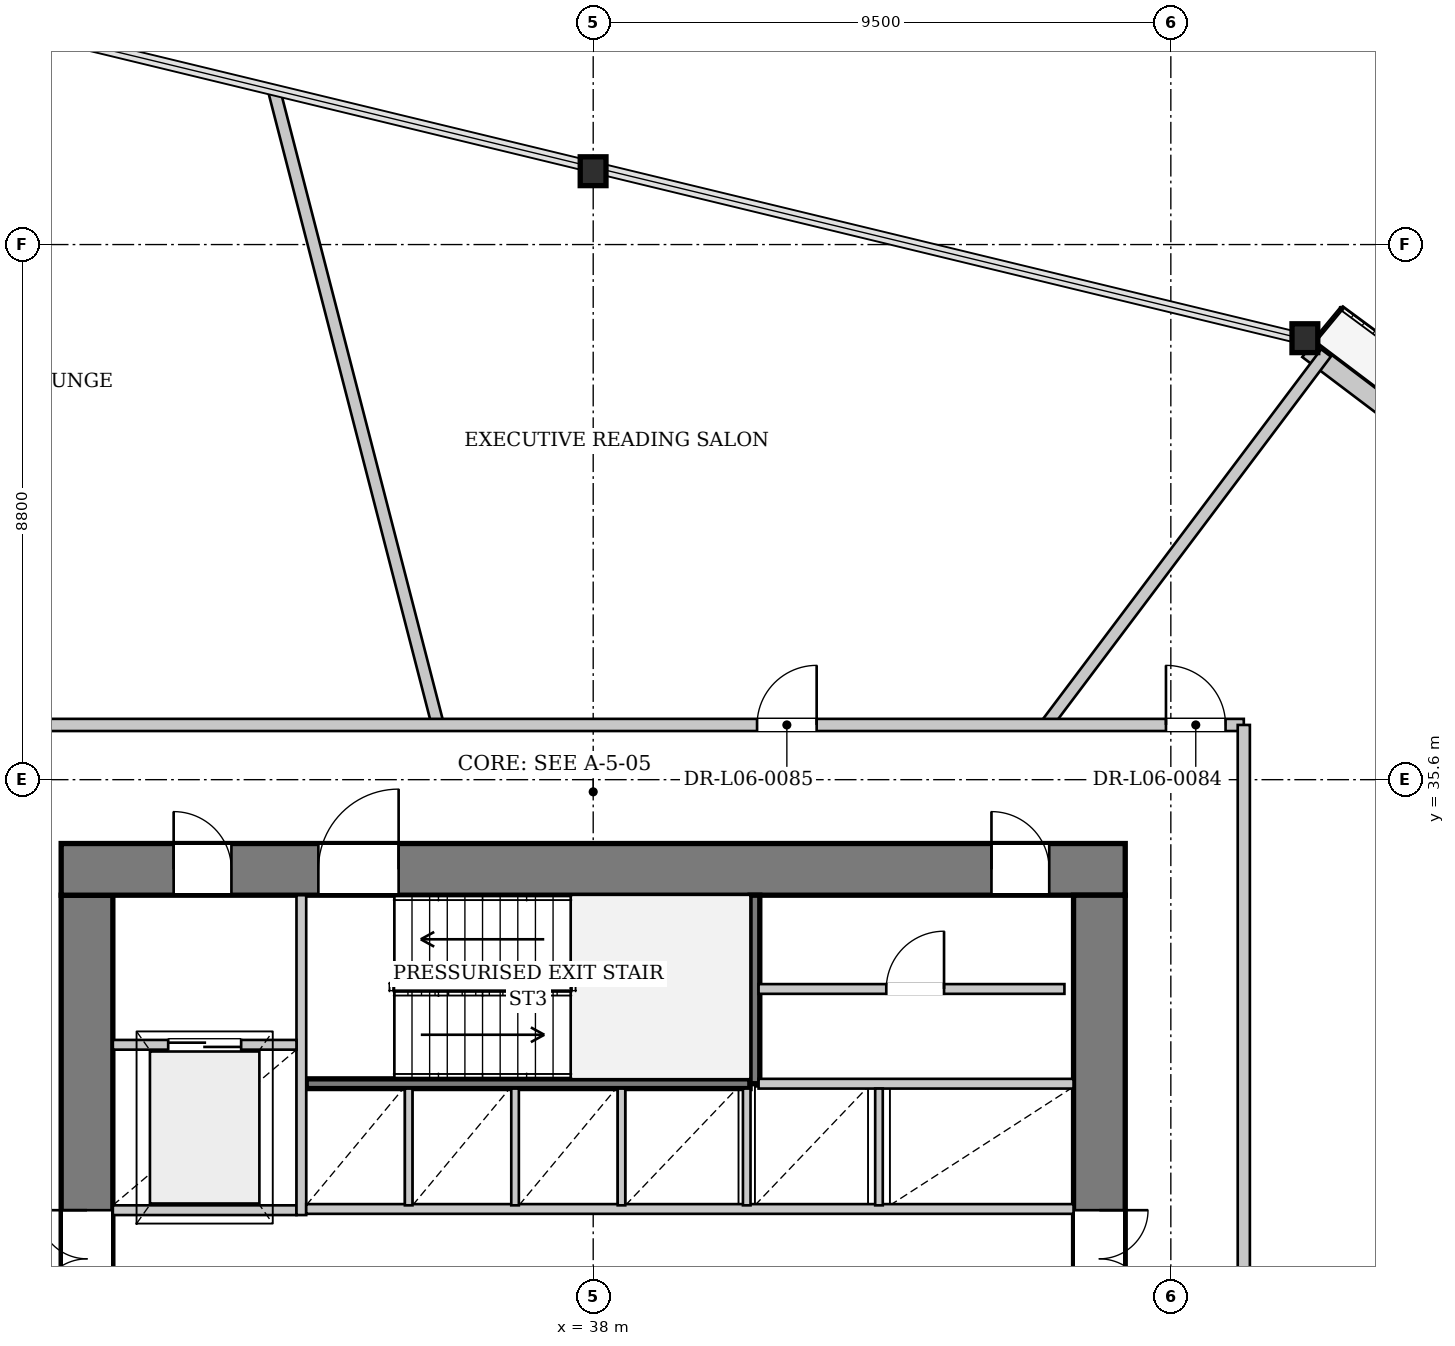
"""IFC4 building model, lengths in metres.
Left out: names, types, materials, properties, quantities, classifications, styles, units other than length and angle.
Written with IfcOpenShell. Run it as: python <this file> out.ifc"""

import sys

from ifc_helpers import new_model, si_unit, direction, frame, frame_2d, origin, origin_2d, place, context, subcontext, project, spatial, rectangle, i_section, extrude, source, transform, mapped, element, fill, save


model = new_model("IFC4")
c1 = context("Model", 3, precision=1e-05, world=origin(), true_north=direction((0.0, 1.0)))
c2 = subcontext(c1, "Body", "Model", "MODEL_VIEW")
j1 = project(units=[si_unit("LENGTHUNIT", "METRE"), si_unit("PLANEANGLEUNIT", "RADIAN")], contexts=[c1])
p1 = place(None, origin())
s1 = spatial("IfcSite", under=j1, at=p1, CompositionType="ELEMENT")
p2 = place(p1, origin())
s2 = spatial("IfcBuilding", under=s1, at=p2, CompositionType="ELEMENT")
p3 = place(p2, frame((0.0, 0.0, 29.3)))
s3 = spatial("IfcBuildingStorey", under=s2, at=p3, CompositionType="ELEMENT", Elevation=29.3)
m1 = source(origin(), c2, "Body", "SweptSolid", [
    extrude(i_section(OverallWidth=0.424, OverallDepth=0.474, WebThickness=0.043, FlangeThickness=0.068, at=origin_2d()), origin(), (0.0, 0.0, 1.0), 3.4),
])
p4 = place(p3, frame((49.854, 42.805, 0.0), z_axis=(-0.088177327317, 0.032168927229, 0.995585214368), x_axis=(-0.342725666193, -0.93943553144, 0.0)))
e1 = element("IfcColumn", 1, at=p4, inside=s3, PredefinedType="COLUMN", context=c2, shape_type="MappedRepresentation", body=[
    mapped(m1, transform((0.0, 0.0, 0.0), x_axis=(1.0, 0.0, 0.0), y_axis=(0.0, 1.0, 0.0), z_axis=(0.0, 0.0, 1.0), scale=1.0)),
])
m2 = source(origin(), c2, "Body", "SweptSolid", [
    extrude(i_section(OverallWidth=0.424, OverallDepth=0.474, WebThickness=0.043, FlangeThickness=0.068, at=origin_2d()), origin(), (0.0, 0.0, 1.0), 3.401),
])
p5 = place(p3, frame((38.159, 45.634, 0.0), z_axis=(-0.094548735687, -0.016583719016, 0.995382095903), x_axis=(0.172761290889, -0.984963723378, 0.0)))
e2 = element("IfcColumn", 2, at=p5, inside=s3, PredefinedType="COLUMN", context=c2, shape_type="MappedRepresentation", body=[
    mapped(m2, transform((0.0, 0.0, 0.0), x_axis=(1.0, 0.0, 0.0), y_axis=(0.0, 1.0, 0.0), z_axis=(0.0, 0.0, 1.0), scale=1.0)),
])
p6 = place(p3, frame((49.758, 42.678, 0.0), z_axis=(0.0, 0.0, 1.0), x_axis=(0.79763695193, -0.603137872229, 0.0)))
e3 = element("IfcWall", 3, at=p6, inside=s3, PredefinedType="SOLIDWALL", context=c2, shape_type="SweptSolid", body=[
    extrude(rectangle(XDim=24.065, YDim=0.32, at=frame_2d((12.033, 0.0))), origin(), (0.0, 0.0, 1.0), 2.592),
])
p7 = place(p6, frame((7.151, 0.0, 0.0)))
e4 = element("IfcOpeningElement", 4, at=p7, cuts=e3, PredefinedType="OPENING", context=c2, shape_type="SweptSolid", body=[
    extrude(rectangle(XDim=1.1, YDim=2.3, at=frame_2d((0.55, 1.15))), frame((0.0, 0.17, 0.0), z_axis=(0.0, -1.0, 0.0), x_axis=(1.0, 0.0, 0.0)), (0.0, 0.0, 1.0), 0.34),
])
p8 = place(p6, frame((16.908, 0.0, 0.272)))
e5 = element("IfcOpeningElement", 5, at=p8, cuts=e3, PredefinedType="OPENING", context=c2, shape_type="SweptSolid", body=[
    extrude(rectangle(XDim=1.8, YDim=2.2, at=frame_2d((0.9, 1.1))), frame((0.0, 0.17, 0.0), z_axis=(0.0, -1.0, 0.0), x_axis=(1.0, 0.0, 0.0)), (0.0, 0.0, 1.0), 0.34),
])
p9 = place(p3, frame((29.675, 19.5, 0.0), z_axis=(0.0, 0.0, 1.0), x_axis=(0.0, 1.0, 0.0)))
e6 = element("IfcWall", 6, at=p9, inside=s3, PredefinedType="SHEAR", context=c2, shape_type="SweptSolid", body=[
    extrude(rectangle(XDim=14.2, YDim=0.85, at=frame_2d((7.1, 0.0))), origin(), (0.0, 0.0, 1.0), 3.3),
])
p10 = place(p9, frame((7.42, 0.0, 0.0)))
e7 = element("IfcOpeningElement", 7, at=p10, cuts=e6, PredefinedType="OPENING", context=c2, shape_type="SweptSolid", body=[
    extrude(rectangle(XDim=1.6, YDim=2.2, at=frame_2d((0.8, 1.1))), frame((0.0, 0.435, 0.0), z_axis=(0.0, -1.0, 0.0), x_axis=(1.0, 0.0, 0.0)), (0.0, 0.0, 1.0), 0.87),
])
p11 = place(p3, frame((29.25, 34.125, 0.0), z_axis=(0.0, 0.0, 1.0), x_axis=(1.0, 0.0, 0.0)))
e8 = element("IfcWall", 8, at=p11, inside=s3, PredefinedType="SHEAR", context=c2, shape_type="SweptSolid", body=[
    extrude(rectangle(XDim=17.5, YDim=0.85, at=frame_2d((8.75, 0.0))), origin(), (0.0, 0.0, 1.0), 3.3),
])
p12 = place(p11, frame((1.85, 0.0, 0.0)))
e9 = element("IfcOpeningElement", 9, at=p12, cuts=e8, PredefinedType="OPENING", context=c2, shape_type="SweptSolid", body=[
    extrude(rectangle(XDim=0.95, YDim=2.1, at=frame_2d((0.475, 1.05))), frame((0.0, 0.435, 0.0), z_axis=(0.0, -1.0, 0.0), x_axis=(1.0, 0.0, 0.0)), (0.0, 0.0, 1.0), 0.87),
])
p13 = place(p11, frame((4.23, 0.0, 0.0)))
e10 = element("IfcOpeningElement", 10, at=p13, cuts=e8, PredefinedType="OPENING", context=c2, shape_type="SweptSolid", body=[
    extrude(rectangle(XDim=1.32, YDim=2.2, at=frame_2d((0.66, 1.1))), frame((0.0, 0.435, 0.0), z_axis=(0.0, -1.0, 0.0), x_axis=(1.0, 0.0, 0.0)), (0.0, 0.0, 1.0), 0.87),
])
p14 = place(p11, frame((15.3, 0.0, 0.0)))
e11 = element("IfcOpeningElement", 11, at=p14, cuts=e8, PredefinedType="OPENING", context=c2, shape_type="SweptSolid", body=[
    extrude(rectangle(XDim=0.95, YDim=2.1, at=frame_2d((0.475, 1.05))), frame((0.0, 0.435, 0.0), z_axis=(0.0, -1.0, 0.0), x_axis=(1.0, 0.0, 0.0)), (0.0, 0.0, 1.0), 0.87),
])
p15 = place(p3, frame((46.325, 33.7, 0.0), z_axis=(0.0, 0.0, 1.0), x_axis=(0.0, -1.0, 0.0)))
e12 = element("IfcWall", 12, at=p15, inside=s3, PredefinedType="SHEAR", context=c2, shape_type="SweptSolid", body=[
    extrude(rectangle(XDim=14.2, YDim=0.85, at=frame_2d((7.1, 0.0))), origin(), (0.0, 0.0, 1.0), 3.3),
])
p16 = place(p15, frame((5.18, 0.0, 0.0)))
e13 = element("IfcOpeningElement", 13, at=p16, cuts=e12, PredefinedType="OPENING", context=c2, shape_type="SweptSolid", body=[
    extrude(rectangle(XDim=1.6, YDim=2.2, at=frame_2d((0.8, 1.1))), frame((0.0, 0.435, 0.0), z_axis=(0.0, -1.0, 0.0), x_axis=(1.0, 0.0, 0.0)), (0.0, 0.0, 1.0), 0.87),
])
p17 = place(p3, frame((33.28, 30.6, 0.0), z_axis=(0.0, 0.0, 1.0), x_axis=(1.0, 0.0, 0.0)))
e14 = element("IfcWall", 14, at=p17, inside=s3, PredefinedType="PARTITIONING", context=c2, shape_type="SweptSolid", body=[
    extrude(rectangle(XDim=7.3, YDim=0.16, at=frame_2d((3.65, 0.0))), origin(), (0.0, 0.0, 1.0), 3.3),
])
p18 = place(p3, frame((40.66, 30.6, 0.0), z_axis=(0.0, 0.0, 1.0), x_axis=(0.0, 1.0, 0.0)))
e15 = element("IfcWall", 15, at=p18, inside=s3, PredefinedType="PARTITIONING", context=c2, shape_type="SweptSolid", body=[
    extrude(rectangle(XDim=3.1, YDim=0.16, at=frame_2d((1.55, 0.0))), origin(), (0.0, 0.0, 1.0), 3.3),
])
p19 = place(p3, frame((30.1, 28.52, 0.0), z_axis=(0.0, 0.0, 1.0), x_axis=(1.0, 0.0, 0.0)))
e16 = element("IfcWall", 16, at=p19, inside=s3, PredefinedType="PARTITIONING", context=c2, shape_type="SweptSolid", body=[
    extrude(rectangle(XDim=3.02, YDim=0.16, at=frame_2d((1.51, 0.0))), origin(), (0.0, 0.0, 1.0), 3.3),
])
p20 = place(p3, frame((33.2, 28.44, 0.0), z_axis=(0.0, 0.0, 1.0), x_axis=(0.0, 1.0, 0.0)))
e17 = element("IfcWall", 17, at=p20, inside=s3, PredefinedType="PARTITIONING", context=c2, shape_type="SweptSolid", body=[
    extrude(rectangle(XDim=5.26, YDim=0.16, at=frame_2d((2.63, 0.0))), origin(), (0.0, 0.0, 1.0), 3.3),
])
p21 = place(p3, frame((30.1, 31.24, 0.0), z_axis=(0.0, 0.0, 1.0), x_axis=(1.0, 0.0, 0.0)))
e18 = element("IfcWall", 18, at=p21, inside=s3, PredefinedType="PARTITIONING", context=c2, shape_type="SweptSolid", body=[
    extrude(rectangle(XDim=3.02, YDim=0.16, at=frame_2d((1.51, 0.0))), origin(), (0.0, 0.0, 1.0), 3.3),
])
p22 = place(p21, frame((0.91, 0.0, 0.0)))
e19 = element("IfcOpeningElement", 19, at=p22, cuts=e18, PredefinedType="OPENING", context=c2, shape_type="SweptSolid", body=[
    extrude(rectangle(XDim=1.2, YDim=2.2, at=frame_2d((0.6, 1.1))), frame((0.0, 0.09, 0.0), z_axis=(0.0, -1.0, 0.0), x_axis=(1.0, 0.0, 0.0)), (0.0, 0.0, 1.0), 0.18),
])
p23 = place(p3, frame((33.28, 28.54, 0.0), z_axis=(0.0, 0.0, 1.0), x_axis=(1.0, 0.0, 0.0)))
e20 = element("IfcWall", 20, at=p23, inside=s3, PredefinedType="PARTITIONING", context=c2, shape_type="SweptSolid", body=[
    extrude(rectangle(XDim=12.62, YDim=0.16, at=frame_2d((6.31, 0.0))), origin(), (0.0, 0.0, 1.0), 3.3),
])
p24 = place(p3, frame((40.72, 30.6, 0.0), z_axis=(0.0, 0.0, 1.0), x_axis=(1.0, 0.0, 0.0)))
e21 = element("IfcWall", 21, at=p24, inside=s3, PredefinedType="PARTITIONING", context=c2, shape_type="SweptSolid", body=[
    extrude(rectangle(XDim=5.18, YDim=0.16, at=frame_2d((2.59, 0.0))), origin(), (0.0, 0.0, 1.0), 3.3),
])
for number, where, z_axis, x_axis in (
    (22, (34.965, 28.6, 0.0), (0.0, 0.0, 1.0), (0.0, 1.0, 0.0)),
    (23, (36.715, 28.6, 0.0), (0.0, 0.0, 1.0), (0.0, 1.0, 0.0)),
    (24, (38.465, 28.6, 0.0), (0.0, 0.0, 1.0), (0.0, 1.0, 0.0)),
    (25, (40.525, 28.6, 0.0), (0.0, 0.0, 1.0), (0.0, 1.0, 0.0)),
    (26, (42.7, 28.6, 0.0), (0.0, 0.0, 1.0), (0.0, 1.0, 0.0)),
):
    element("IfcWall", number, at=place(p3, frame(where, z_axis=z_axis, x_axis=x_axis)), inside=s3, PredefinedType="PARTITIONING", context=c2, shape_type="SweptSolid", body=[
        extrude(rectangle(XDim=1.92, YDim=0.125, at=frame_2d((0.96, 0.0))), origin(), (0.0, 0.0, 1.0), 3.3),
    ])
p25 = place(p3, frame((40.72, 32.158, 0.0), z_axis=(0.0, 0.0, 1.0), x_axis=(1.0, 0.0, 0.0)))
e27 = element("IfcWall", 27, at=p25, inside=s3, PredefinedType="PARTITIONING", context=c2, shape_type="SweptSolid", body=[
    extrude(rectangle(XDim=5.03, YDim=0.16, at=frame_2d((2.515, 0.0))), origin(), (0.0, 0.0, 1.0), 3.3),
])
p26 = place(p25, frame((2.1, 0.0, 0.0)))
e28 = element("IfcOpeningElement", 28, at=p26, cuts=e27, PredefinedType="OPENING", context=c2, shape_type="SweptSolid", body=[
    extrude(rectangle(XDim=0.95, YDim=2.1, at=frame_2d((0.475, 1.05))), frame((0.0, 0.09, 0.0), z_axis=(0.0, -1.0, 0.0), x_axis=(1.0, 0.0, 0.0)), (0.0, 0.0, 1.0), 0.18),
])
p27 = place(p3, frame((45.448, 36.5, 0.0), z_axis=(0.0, 0.0, 1.0), x_axis=(0.601228787699, 0.799076932993, 0.0)))
e29 = element("IfcWall", 29, at=p27, inside=s3, PredefinedType="PARTITIONING", context=c2, shape_type="SweptSolid", body=[
    extrude(rectangle(XDim=7.657, YDim=0.2, at=frame_2d((3.828, 0.0))), origin(), (0.0, 0.0, 1.0), 3.3),
])
p28 = place(p3, frame((35.445, 36.5, 0.0), z_axis=(0.0, 0.0, 1.0), x_axis=(-0.249907551093, 0.968269702049, 0.0)))
e30 = element("IfcWall", 30, at=p28, inside=s3, PredefinedType="PARTITIONING", context=c2, shape_type="SweptSolid", body=[
    extrude(rectangle(XDim=10.751, YDim=0.2, at=frame_2d((5.375, 0.0))), origin(), (0.0, 0.0, 1.0), 3.3),
])
p29 = place(p3, frame((27.3, 36.5, 0.0), z_axis=(0.0, 0.0, 1.0), x_axis=(1.0, 0.0, 0.0)))
e31 = element("IfcWall", 31, at=p29, inside=s3, PredefinedType="PARTITIONING", context=c2, shape_type="SweptSolid", body=[
    extrude(rectangle(XDim=21.4, YDim=0.2, at=frame_2d((10.7, 0.0))), origin(), (0.0, 0.0, 1.0), 3.3),
])
p30 = place(p29, frame((20.12, 0.0, 0.0)))
e32 = element("IfcOpeningElement", 32, at=p30, cuts=e31, PredefinedType="OPENING", context=c2, shape_type="SweptSolid", body=[
    extrude(rectangle(XDim=0.98, YDim=2.15, at=frame_2d((0.49, 1.075))), frame((0.0, 0.11, 0.0), z_axis=(0.0, -1.0, 0.0), x_axis=(1.0, 0.0, 0.0)), (0.0, 0.0, 1.0), 0.22),
])
p31 = place(p29, frame((13.395, 0.0, 0.0)))
e33 = element("IfcOpeningElement", 33, at=p31, cuts=e31, PredefinedType="OPENING", context=c2, shape_type="SweptSolid", body=[
    extrude(rectangle(XDim=0.98, YDim=2.15, at=frame_2d((0.49, 1.075))), frame((0.0, 0.11, 0.0), z_axis=(0.0, -1.0, 0.0), x_axis=(1.0, 0.0, 0.0)), (0.0, 0.0, 1.0), 0.22),
])
p32 = place(p3, frame((48.7, 16.7, 0.0), z_axis=(0.0, 0.0, 1.0), x_axis=(0.0, 1.0, 0.0)))
e34 = element("IfcWall", 34, at=p32, inside=s3, PredefinedType="PARTITIONING", context=c2, shape_type="SweptSolid", body=[
    extrude(rectangle(XDim=19.8, YDim=0.2, at=frame_2d((9.9, 0.0))), origin(), (0.0, 0.0, 1.0), 3.3),
])
m3 = source(origin(), c2, "Body", "SweptSolid", [
    extrude(rectangle(XDim=1.6, YDim=2.2, at=frame_2d((0.8, 1.1))), frame((0.0, 0.025, 0.0), z_axis=(0.0, -1.0, 0.0), x_axis=(1.0, 0.0, 0.0)), (0.0, 0.0, 1.0), 0.05),
])
p33 = place(p10, origin())
e35 = element("IfcDoor", 35, at=p33, inside=s3, OperationType="DOUBLE_DOOR_SINGLE_SWING", PredefinedType="DOOR", context=c2, shape_type="MappedRepresentation", body=[
    mapped(m3, transform((0.0, 0.0, 0.0), x_axis=(1.0, 0.0, 0.0), y_axis=(0.0, 1.0, 0.0), z_axis=(0.0, 0.0, 1.0), scale=1.0)),
])
fill(e7, e35)
m4 = source(origin(), c2, "Body", "SweptSolid", [
    extrude(rectangle(XDim=0.95, YDim=2.1, at=frame_2d((0.475, 1.05))), frame((0.0, 0.025, 0.0), z_axis=(0.0, -1.0, 0.0), x_axis=(1.0, 0.0, 0.0)), (0.0, 0.0, 1.0), 0.05),
])
p34 = place(p12, origin())
e36 = element("IfcDoor", 36, at=p34, inside=s3, OperationType="SINGLE_SWING_LEFT", PredefinedType="DOOR", context=c2, shape_type="MappedRepresentation", body=[
    mapped(m4, transform((0.0, 0.0, 0.0), x_axis=(1.0, 0.0, 0.0), y_axis=(0.0, 1.0, 0.0), z_axis=(0.0, 0.0, 1.0), scale=1.0)),
])
fill(e9, e36)
m5 = source(origin(), c2, "Body", "SweptSolid", [
    extrude(rectangle(XDim=1.32, YDim=2.2, at=frame_2d((0.66, 1.1))), frame((0.0, 0.025, 0.0), z_axis=(0.0, -1.0, 0.0), x_axis=(1.0, 0.0, 0.0)), (0.0, 0.0, 1.0), 0.05),
])
p35 = place(p13, origin())
e37 = element("IfcDoor", 37, at=p35, inside=s3, OperationType="SINGLE_SWING_RIGHT", PredefinedType="DOOR", context=c2, shape_type="MappedRepresentation", body=[
    mapped(m5, transform((0.0, 0.0, 0.0), x_axis=(1.0, 0.0, 0.0), y_axis=(0.0, 1.0, 0.0), z_axis=(0.0, 0.0, 1.0), scale=1.0)),
])
fill(e10, e37)
p36 = place(p16, origin())
e38 = element("IfcDoor", 38, at=p36, inside=s3, OperationType="DOUBLE_DOOR_SINGLE_SWING", PredefinedType="DOOR", context=c2, shape_type="MappedRepresentation", body=[
    mapped(m3, transform((0.0, 0.0, 0.0), x_axis=(1.0, 0.0, 0.0), y_axis=(0.0, 1.0, 0.0), z_axis=(0.0, 0.0, 1.0), scale=1.0)),
])
fill(e13, e38)
m6 = source(origin(), c2, "Body", "SweptSolid", [
    extrude(rectangle(XDim=1.2, YDim=2.2, at=frame_2d((0.6, 1.1))), frame((0.0, 0.025, 0.0), z_axis=(0.0, -1.0, 0.0), x_axis=(1.0, 0.0, 0.0)), (0.0, 0.0, 1.0), 0.05),
])
p37 = place(p22, origin())
e39 = element("IfcDoor", 39, at=p37, inside=s3, OperationType="DOUBLE_DOOR_SLIDING", PredefinedType="DOOR", context=c2, shape_type="MappedRepresentation", body=[
    mapped(m6, transform((0.0, 0.0, 0.0), x_axis=(1.0, 0.0, 0.0), y_axis=(0.0, 1.0, 0.0), z_axis=(0.0, 0.0, 1.0), scale=1.0)),
])
fill(e19, e39)
p38 = place(p26, origin())
e40 = element("IfcDoor", 40, at=p38, inside=s3, OperationType="SINGLE_SWING_RIGHT", PredefinedType="DOOR", context=c2, shape_type="MappedRepresentation", body=[
    mapped(m4, transform((0.0, 0.0, 0.0), x_axis=(1.0, 0.0, 0.0), y_axis=(0.0, 1.0, 0.0), z_axis=(0.0, 0.0, 1.0), scale=1.0)),
])
fill(e28, e40)
p39 = place(p14, origin())
e41 = element("IfcDoor", 41, at=p39, inside=s3, OperationType="SINGLE_SWING_LEFT", PredefinedType="DOOR", context=c2, shape_type="MappedRepresentation", body=[
    mapped(m4, transform((0.0, 0.0, 0.0), x_axis=(1.0, 0.0, 0.0), y_axis=(0.0, 1.0, 0.0), z_axis=(0.0, 0.0, 1.0), scale=1.0)),
])
fill(e11, e41)
m7 = source(origin(), c2, "Body", "SweptSolid", [
    extrude(rectangle(XDim=0.98, YDim=2.15, at=frame_2d((0.49, 1.075))), frame((0.0, 0.025, 0.0), z_axis=(0.0, -1.0, 0.0), x_axis=(1.0, 0.0, 0.0)), (0.0, 0.0, 1.0), 0.05),
])
p40 = place(p30, origin())
e42 = element("IfcDoor", 42, at=p40, inside=s3, OperationType="SINGLE_SWING_LEFT", PredefinedType="DOOR", context=c2, shape_type="MappedRepresentation", body=[
    mapped(m7, transform((0.0, 0.0, 0.0), x_axis=(1.0, 0.0, 0.0), y_axis=(0.0, 1.0, 0.0), z_axis=(0.0, 0.0, 1.0), scale=1.0)),
])
fill(e32, e42)
p41 = place(p31, origin())
e43 = element("IfcDoor", 43, at=p41, inside=s3, OperationType="SINGLE_SWING_RIGHT", PredefinedType="DOOR", context=c2, shape_type="MappedRepresentation", body=[
    mapped(m7, transform((0.0, 0.0, 0.0), x_axis=(1.0, 0.0, 0.0), y_axis=(0.0, 1.0, 0.0), z_axis=(0.0, 0.0, 1.0), scale=1.0)),
])
fill(e33, e43)
save(model, sys.argv[1])
